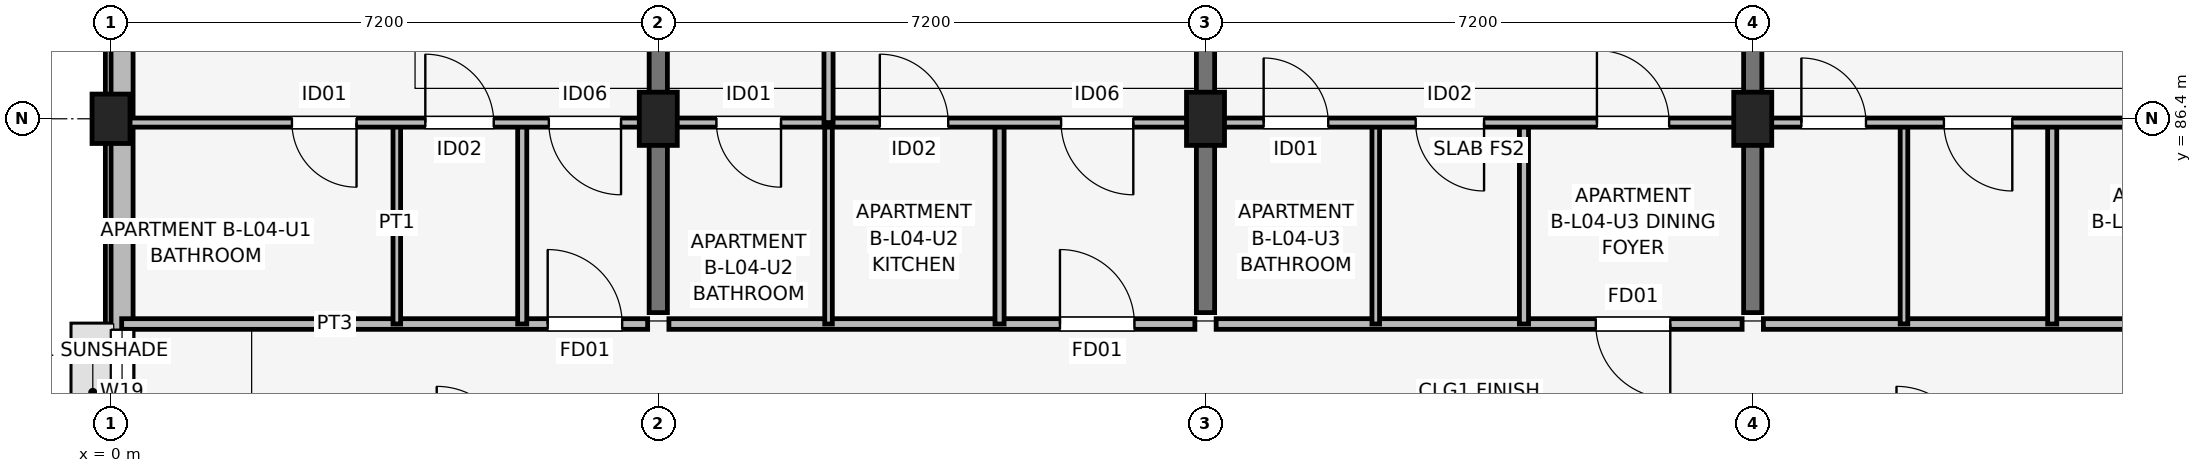
"""IFC4 building model, lengths in metres.
Left out: names, types, materials, properties, quantities, classifications, styles, units other than length and angle.
Written with IfcOpenShell. Run it as: python <this file> out.ifc"""

import sys

from ifc_helpers import new_model, si_unit, direction, frame, frame_2d, origin, origin_2d, place, context, subcontext, project, spatial, rectangle, extrude, element, fill, save


model = new_model("IFC4")
c1 = context("Model", 3, precision=1e-05, world=origin(), true_north=direction((0.0, 1.0)))
c2 = subcontext(c1, "Body", "Model", "MODEL_VIEW")
j1 = project(units=[si_unit("LENGTHUNIT", "METRE"), si_unit("PLANEANGLEUNIT", "RADIAN")], contexts=[c1])
p1 = place(None, origin())
s1 = spatial("IfcSite", under=j1, at=p1, CompositionType="ELEMENT")
p2 = place(p1, origin())
s2 = spatial("IfcBuilding", under=s1, at=p2, CompositionType="ELEMENT")
p3 = place(p2, frame((0.0, 0.0, 15.0)))
s3 = spatial("IfcBuildingStorey", under=s2, at=p3, CompositionType="ELEMENT", Elevation=15.0)
p4 = place(p3, frame((0.0, 86.4, 0.0), z_axis=(0.0, 0.0, 1.0), x_axis=(1.0, 0.0, 0.0)))
e1 = element("IfcColumn", 1, at=p4, inside=s3, PredefinedType="COLUMN", context=c2, shape_type="SweptSolid", body=[
    extrude(rectangle(XDim=0.5, YDim=0.65, at=origin_2d()), origin(), (0.0, 0.0, 1.0), 3.15),
])
for number, where, z_axis, x_axis in (
    (2, (7.2, 86.4, 0.0), (0.0, 0.0, 1.0), (1.0, 0.0, 0.0)),
    (3, (14.4, 86.4, 0.0), (0.0, 0.0, 1.0), (1.0, 0.0, 0.0)),
    (4, (21.6, 86.4, 0.0), (0.0, 0.0, 1.0), (1.0, 0.0, 0.0)),
):
    element("IfcColumn", number, at=place(p3, frame(where, z_axis=z_axis, x_axis=x_axis)), inside=s3, PredefinedType="COLUMN", context=c2, shape_type="SweptSolid", body=[
        extrude(rectangle(XDim=0.5, YDim=0.7, at=origin_2d()), origin(), (0.0, 0.0, 1.0), 3.15),
    ])
for number, where, z_axis, x_axis in (
    (5, (7.2, 83.85, 0.0), (0.0, 0.0, 1.0), (0.0, 1.0, 0.0)),
    (6, (14.4, 83.85, 0.0), (0.0, 0.0, 1.0), (0.0, 1.0, 0.0)),
    (7, (21.6, 83.85, 0.0), (0.0, 0.0, 1.0), (0.0, 1.0, 0.0)),
):
    element("IfcWall", number, at=place(p3, frame(where, z_axis=z_axis, x_axis=x_axis)), inside=s3, PredefinedType="SHEAR", context=c2, shape_type="SweptSolid", body=[
        extrude(rectangle(XDim=9.4, YDim=0.24, at=frame_2d((4.7, 0.0))), origin(), (0.0, 0.0, 1.0), 3.15),
    ])
p5 = place(p3, frame((0.145, 90.4, 0.0), z_axis=(0.0, 0.0, 1.0), x_axis=(0.0, -1.0, 0.0)))
e8 = element("IfcWall", 8, at=p5, inside=s3, PredefinedType="SOLIDWALL", context=c2, shape_type="SweptSolid", body=[
    extrude(rectangle(XDim=15.2, YDim=0.29, at=frame_2d((7.6, 0.0))), origin(), (0.0, 0.0, 1.0), 2.38),
])
p6 = place(p5, frame((6.775, 0.0, 1.05)))
e9 = element("IfcOpeningElement", 9, at=p6, cuts=e8, PredefinedType="OPENING", context=c2, shape_type="SweptSolid", body=[
    extrude(rectangle(XDim=1.65, YDim=1.15, at=frame_2d((0.825, 0.575))), frame((0.0, 0.155, 0.0), z_axis=(0.0, -1.0, 0.0), x_axis=(1.0, 0.0, 0.0)), (0.0, 0.0, 1.0), 0.31),
])
p7 = place(p5, frame((1.272, 0.0, 0.72)))
e10 = element("IfcOpeningElement", 10, at=p7, cuts=e8, PredefinedType="OPENING", context=c2, shape_type="SweptSolid", body=[
    extrude(rectangle(XDim=1.3, YDim=1.55, at=frame_2d((0.65, 0.775))), frame((0.0, 0.155, 0.0), z_axis=(0.0, -1.0, 0.0), x_axis=(1.0, 0.0, 0.0)), (0.0, 0.0, 1.0), 0.31),
])
p8 = place(p3, frame((0.14, 83.7, 0.0), z_axis=(0.0, 0.0, 1.0), x_axis=(1.0, 0.0, 0.0)))
e11 = element("IfcWall", 11, at=p8, inside=s3, PredefinedType="PARTITIONING", context=c2, shape_type="SweptSolid", body=[
    extrude(rectangle(XDim=6.92, YDim=0.14, at=frame_2d((3.46, 0.0))), origin(), (0.0, 0.0, 1.0), 2.38),
])
p9 = place(p8, frame((5.605, 0.0, 0.0)))
e12 = element("IfcOpeningElement", 12, at=p9, cuts=e11, PredefinedType="OPENING", context=c2, shape_type="SweptSolid", body=[
    extrude(rectangle(XDim=0.98, YDim=2.1, at=frame_2d((0.49, 1.05))), frame((0.0, 0.08, 0.0), z_axis=(0.0, -1.0, 0.0), x_axis=(1.0, 0.0, 0.0)), (0.0, 0.0, 1.0), 0.16),
])
p10 = place(p3, frame((3.76, 83.7, 0.0), z_axis=(0.0, 0.0, 1.0), x_axis=(0.0, 1.0, 0.0)))
e13 = element("IfcWall", 13, at=p10, inside=s3, PredefinedType="PARTITIONING", context=c2, shape_type="SweptSolid", body=[
    extrude(rectangle(XDim=2.65, YDim=0.1, at=frame_2d((1.325, 0.0))), origin(), (0.0, 0.0, 1.0), 2.375),
])
p11 = place(p3, frame((5.41, 83.7, 0.0), z_axis=(0.0, 0.0, 1.0), x_axis=(0.0, 1.0, 0.0)))
e14 = element("IfcWall", 14, at=p11, inside=s3, PredefinedType="PARTITIONING", context=c2, shape_type="SweptSolid", body=[
    extrude(rectangle(XDim=2.65, YDim=0.12, at=frame_2d((1.325, 0.0))), origin(), (0.0, 0.0, 1.0), 2.375),
])
p12 = place(p3, frame((0.14, 86.35, 0.0), z_axis=(0.0, 0.0, 1.0), x_axis=(1.0, 0.0, 0.0)))
e15 = element("IfcWall", 15, at=p12, inside=s3, PredefinedType="PARTITIONING", context=c2, shape_type="SweptSolid", body=[
    extrude(rectangle(XDim=6.92, YDim=0.12, at=frame_2d((3.46, 0.0))), origin(), (0.0, 0.0, 1.0), 2.375),
])
p13 = place(p12, frame((3.09, 0.0, 0.0), z_axis=(0.0, 0.0, 1.0), x_axis=(-1.0, 0.0, 0.0)))
e16 = element("IfcOpeningElement", 16, at=p13, cuts=e15, PredefinedType="OPENING", context=c2, shape_type="SweptSolid", body=[
    extrude(rectangle(XDim=0.85, YDim=2.08, at=frame_2d((0.425, 1.04))), frame((0.0, 0.07, 0.0), z_axis=(0.0, -1.0, 0.0), x_axis=(1.0, 0.0, 0.0)), (0.0, 0.0, 1.0), 0.14),
])
p14 = place(p12, frame((3.995, 0.0, 0.0)))
e17 = element("IfcOpeningElement", 17, at=p14, cuts=e15, PredefinedType="OPENING", context=c2, shape_type="SweptSolid", body=[
    extrude(rectangle(XDim=0.9, YDim=2.08, at=frame_2d((0.45, 1.04))), frame((0.0, 0.07, 0.0), z_axis=(0.0, -1.0, 0.0), x_axis=(1.0, 0.0, 0.0)), (0.0, 0.0, 1.0), 0.14),
])
p15 = place(p12, frame((6.57, 0.0, 0.0), z_axis=(0.0, 0.0, 1.0), x_axis=(-1.0, 0.0, 0.0)))
e18 = element("IfcOpeningElement", 18, at=p15, cuts=e15, PredefinedType="OPENING", context=c2, shape_type="SweptSolid", body=[
    extrude(rectangle(XDim=0.95, YDim=2.08, at=frame_2d((0.475, 1.04))), frame((0.0, 0.07, 0.0), z_axis=(0.0, -1.0, 0.0), x_axis=(1.0, 0.0, 0.0)), (0.0, 0.0, 1.0), 0.14),
])
p16 = place(p3, frame((7.34, 83.7, 0.0), z_axis=(0.0, 0.0, 1.0), x_axis=(1.0, 0.0, 0.0)))
e19 = element("IfcWall", 19, at=p16, inside=s3, PredefinedType="PARTITIONING", context=c2, shape_type="SweptSolid", body=[
    extrude(rectangle(XDim=6.92, YDim=0.14, at=frame_2d((3.46, 0.0))), origin(), (0.0, 0.0, 1.0), 2.38),
])
p17 = place(p16, frame((5.145, 0.0, 0.0)))
e20 = element("IfcOpeningElement", 20, at=p17, cuts=e19, PredefinedType="OPENING", context=c2, shape_type="SweptSolid", body=[
    extrude(rectangle(XDim=0.98, YDim=2.1, at=frame_2d((0.49, 1.05))), frame((0.0, 0.08, 0.0), z_axis=(0.0, -1.0, 0.0), x_axis=(1.0, 0.0, 0.0)), (0.0, 0.0, 1.0), 0.16),
])
p18 = place(p3, frame((9.44, 83.7, 0.0), z_axis=(0.0, 0.0, 1.0), x_axis=(0.0, 1.0, 0.0)))
e21 = element("IfcWall", 21, at=p18, inside=s3, PredefinedType="PARTITIONING", context=c2, shape_type="SweptSolid", body=[
    extrude(rectangle(XDim=2.65, YDim=0.1, at=frame_2d((1.325, 0.0))), origin(), (0.0, 0.0, 1.0), 2.375),
])
p19 = place(p3, frame((11.69, 83.7, 0.0), z_axis=(0.0, 0.0, 1.0), x_axis=(0.0, 1.0, 0.0)))
e22 = element("IfcWall", 22, at=p19, inside=s3, PredefinedType="PARTITIONING", context=c2, shape_type="SweptSolid", body=[
    extrude(rectangle(XDim=2.65, YDim=0.12, at=frame_2d((1.325, 0.0))), origin(), (0.0, 0.0, 1.0), 2.375),
])
p20 = place(p3, frame((7.34, 86.35, 0.0), z_axis=(0.0, 0.0, 1.0), x_axis=(1.0, 0.0, 0.0)))
e23 = element("IfcWall", 23, at=p20, inside=s3, PredefinedType="PARTITIONING", context=c2, shape_type="SweptSolid", body=[
    extrude(rectangle(XDim=6.92, YDim=0.12, at=frame_2d((3.46, 0.0))), origin(), (0.0, 0.0, 1.0), 2.375),
])
p21 = place(p20, frame((1.475, 0.0, 0.0), z_axis=(0.0, 0.0, 1.0), x_axis=(-1.0, 0.0, 0.0)))
e24 = element("IfcOpeningElement", 24, at=p21, cuts=e23, PredefinedType="OPENING", context=c2, shape_type="SweptSolid", body=[
    extrude(rectangle(XDim=0.85, YDim=2.08, at=frame_2d((0.425, 1.04))), frame((0.0, 0.07, 0.0), z_axis=(0.0, -1.0, 0.0), x_axis=(1.0, 0.0, 0.0)), (0.0, 0.0, 1.0), 0.14),
])
p22 = place(p20, frame((2.775, 0.0, 0.0)))
e25 = element("IfcOpeningElement", 25, at=p22, cuts=e23, PredefinedType="OPENING", context=c2, shape_type="SweptSolid", body=[
    extrude(rectangle(XDim=0.9, YDim=2.08, at=frame_2d((0.45, 1.04))), frame((0.0, 0.07, 0.0), z_axis=(0.0, -1.0, 0.0), x_axis=(1.0, 0.0, 0.0)), (0.0, 0.0, 1.0), 0.14),
])
p23 = place(p20, frame((6.11, 0.0, 0.0), z_axis=(0.0, 0.0, 1.0), x_axis=(-1.0, 0.0, 0.0)))
e26 = element("IfcOpeningElement", 26, at=p23, cuts=e23, PredefinedType="OPENING", context=c2, shape_type="SweptSolid", body=[
    extrude(rectangle(XDim=0.95, YDim=2.08, at=frame_2d((0.475, 1.04))), frame((0.0, 0.07, 0.0), z_axis=(0.0, -1.0, 0.0), x_axis=(1.0, 0.0, 0.0)), (0.0, 0.0, 1.0), 0.14),
])
p24 = place(p3, frame((9.44, 86.35, 0.0), z_axis=(0.0, 0.0, 1.0), x_axis=(0.0, 1.0, 0.0)))
e27 = element("IfcWall", 27, at=p24, inside=s3, PredefinedType="PARTITIONING", context=c2, shape_type="SweptSolid", body=[
    extrude(rectangle(XDim=6.95, YDim=0.12, at=frame_2d((3.475, 0.0))), origin(), (0.0, 0.0, 1.0), 2.375),
])
p25 = place(p24, frame((3.025, 0.0, 0.0)))
e28 = element("IfcOpeningElement", 28, at=p25, cuts=e27, PredefinedType="OPENING", context=c2, shape_type="SweptSolid", body=[
    extrude(rectangle(XDim=0.9, YDim=2.08, at=frame_2d((0.45, 1.04))), frame((0.0, 0.07, 0.0), z_axis=(0.0, -1.0, 0.0), x_axis=(1.0, 0.0, 0.0)), (0.0, 0.0, 1.0), 0.14),
])
p26 = place(p3, frame((14.54, 83.7, 0.0), z_axis=(0.0, 0.0, 1.0), x_axis=(1.0, 0.0, 0.0)))
e29 = element("IfcWall", 29, at=p26, inside=s3, PredefinedType="PARTITIONING", context=c2, shape_type="SweptSolid", body=[
    extrude(rectangle(XDim=6.92, YDim=0.14, at=frame_2d((3.46, 0.0))), origin(), (0.0, 0.0, 1.0), 2.38),
])
p27 = place(p26, frame((5.975, 0.0, 0.0), z_axis=(0.0, 0.0, 1.0), x_axis=(-1.0, 0.0, 0.0)))
e30 = element("IfcOpeningElement", 30, at=p27, cuts=e29, PredefinedType="OPENING", context=c2, shape_type="SweptSolid", body=[
    extrude(rectangle(XDim=0.98, YDim=2.1, at=frame_2d((0.49, 1.05))), frame((0.0, 0.08, 0.0), z_axis=(0.0, -1.0, 0.0), x_axis=(1.0, 0.0, 0.0)), (0.0, 0.0, 1.0), 0.16),
])
p28 = place(p3, frame((16.64, 83.7, 0.0), z_axis=(0.0, 0.0, 1.0), x_axis=(0.0, 1.0, 0.0)))
e31 = element("IfcWall", 31, at=p28, inside=s3, PredefinedType="PARTITIONING", context=c2, shape_type="SweptSolid", body=[
    extrude(rectangle(XDim=2.65, YDim=0.1, at=frame_2d((1.325, 0.0))), origin(), (0.0, 0.0, 1.0), 2.375),
])
p29 = place(p3, frame((18.59, 83.7, 0.0), z_axis=(0.0, 0.0, 1.0), x_axis=(0.0, 1.0, 0.0)))
e32 = element("IfcWall", 32, at=p29, inside=s3, PredefinedType="PARTITIONING", context=c2, shape_type="SweptSolid", body=[
    extrude(rectangle(XDim=2.65, YDim=0.12, at=frame_2d((1.325, 0.0))), origin(), (0.0, 0.0, 1.0), 2.375),
])
p30 = place(p3, frame((14.54, 86.35, 0.0), z_axis=(0.0, 0.0, 1.0), x_axis=(1.0, 0.0, 0.0)))
e33 = element("IfcWall", 33, at=p30, inside=s3, PredefinedType="PARTITIONING", context=c2, shape_type="SweptSolid", body=[
    extrude(rectangle(XDim=6.92, YDim=0.12, at=frame_2d((3.46, 0.0))), origin(), (0.0, 0.0, 1.0), 2.375),
])
p31 = place(p30, frame((0.625, 0.0, 0.0)))
e34 = element("IfcOpeningElement", 34, at=p31, cuts=e33, PredefinedType="OPENING", context=c2, shape_type="SweptSolid", body=[
    extrude(rectangle(XDim=0.85, YDim=2.08, at=frame_2d((0.425, 1.04))), frame((0.0, 0.07, 0.0), z_axis=(0.0, -1.0, 0.0), x_axis=(1.0, 0.0, 0.0)), (0.0, 0.0, 1.0), 0.14),
])
p32 = place(p30, frame((3.525, 0.0, 0.0), z_axis=(0.0, 0.0, 1.0), x_axis=(-1.0, 0.0, 0.0)))
e35 = element("IfcOpeningElement", 35, at=p32, cuts=e33, PredefinedType="OPENING", context=c2, shape_type="SweptSolid", body=[
    extrude(rectangle(XDim=0.9, YDim=2.08, at=frame_2d((0.45, 1.04))), frame((0.0, 0.07, 0.0), z_axis=(0.0, -1.0, 0.0), x_axis=(1.0, 0.0, 0.0)), (0.0, 0.0, 1.0), 0.14),
])
p33 = place(p30, frame((5.01, 0.0, 0.0)))
e36 = element("IfcOpeningElement", 36, at=p33, cuts=e33, PredefinedType="OPENING", context=c2, shape_type="SweptSolid", body=[
    extrude(rectangle(XDim=0.95, YDim=2.08, at=frame_2d((0.475, 1.04))), frame((0.0, 0.07, 0.0), z_axis=(0.0, -1.0, 0.0), x_axis=(1.0, 0.0, 0.0)), (0.0, 0.0, 1.0), 0.14),
])
p34 = place(p3, frame((21.74, 83.7, 0.0), z_axis=(0.0, 0.0, 1.0), x_axis=(1.0, 0.0, 0.0)))
e37 = element("IfcWall", 37, at=p34, inside=s3, PredefinedType="PARTITIONING", context=c2, shape_type="SweptSolid", body=[
    extrude(rectangle(XDim=6.92, YDim=0.14, at=frame_2d((3.46, 0.0))), origin(), (0.0, 0.0, 1.0), 2.38),
])
p35 = place(p34, frame((5.85, 0.0, 0.0), z_axis=(0.0, 0.0, 1.0), x_axis=(-1.0, 0.0, 0.0)))
e38 = element("IfcOpeningElement", 38, at=p35, cuts=e37, PredefinedType="OPENING", context=c2, shape_type="SweptSolid", body=[
    extrude(rectangle(XDim=0.98, YDim=2.1, at=frame_2d((0.49, 1.05))), frame((0.0, 0.08, 0.0), z_axis=(0.0, -1.0, 0.0), x_axis=(1.0, 0.0, 0.0)), (0.0, 0.0, 1.0), 0.16),
])
p36 = place(p3, frame((23.59, 83.7, 0.0), z_axis=(0.0, 0.0, 1.0), x_axis=(0.0, 1.0, 0.0)))
e39 = element("IfcWall", 39, at=p36, inside=s3, PredefinedType="PARTITIONING", context=c2, shape_type="SweptSolid", body=[
    extrude(rectangle(XDim=2.65, YDim=0.1, at=frame_2d((1.325, 0.0))), origin(), (0.0, 0.0, 1.0), 2.375),
])
p37 = place(p3, frame((25.54, 83.7, 0.0), z_axis=(0.0, 0.0, 1.0), x_axis=(0.0, 1.0, 0.0)))
e40 = element("IfcWall", 40, at=p37, inside=s3, PredefinedType="PARTITIONING", context=c2, shape_type="SweptSolid", body=[
    extrude(rectangle(XDim=2.65, YDim=0.12, at=frame_2d((1.325, 0.0))), origin(), (0.0, 0.0, 1.0), 2.375),
])
p38 = place(p3, frame((21.74, 86.35, 0.0), z_axis=(0.0, 0.0, 1.0), x_axis=(1.0, 0.0, 0.0)))
e41 = element("IfcWall", 41, at=p38, inside=s3, PredefinedType="PARTITIONING", context=c2, shape_type="SweptSolid", body=[
    extrude(rectangle(XDim=6.92, YDim=0.12, at=frame_2d((3.46, 0.0))), origin(), (0.0, 0.0, 1.0), 2.375),
])
p39 = place(p38, frame((0.5, 0.0, 0.0)))
e42 = element("IfcOpeningElement", 42, at=p39, cuts=e41, PredefinedType="OPENING", context=c2, shape_type="SweptSolid", body=[
    extrude(rectangle(XDim=0.85, YDim=2.08, at=frame_2d((0.425, 1.04))), frame((0.0, 0.07, 0.0), z_axis=(0.0, -1.0, 0.0), x_axis=(1.0, 0.0, 0.0)), (0.0, 0.0, 1.0), 0.14),
])
p40 = place(p38, frame((3.275, 0.0, 0.0), z_axis=(0.0, 0.0, 1.0), x_axis=(-1.0, 0.0, 0.0)))
e43 = element("IfcOpeningElement", 43, at=p40, cuts=e41, PredefinedType="OPENING", context=c2, shape_type="SweptSolid", body=[
    extrude(rectangle(XDim=0.9, YDim=2.08, at=frame_2d((0.45, 1.04))), frame((0.0, 0.07, 0.0), z_axis=(0.0, -1.0, 0.0), x_axis=(1.0, 0.0, 0.0)), (0.0, 0.0, 1.0), 0.14),
])
p41 = place(p38, frame((4.885, 0.0, 0.0)))
e44 = element("IfcOpeningElement", 44, at=p41, cuts=e41, PredefinedType="OPENING", context=c2, shape_type="SweptSolid", body=[
    extrude(rectangle(XDim=0.95, YDim=2.08, at=frame_2d((0.475, 1.04))), frame((0.0, 0.07, 0.0), z_axis=(0.0, -1.0, 0.0), x_axis=(1.0, 0.0, 0.0)), (0.0, 0.0, 1.0), 0.14),
])
p42 = place(p6, origin())
e45 = element("IfcWindow", 45, at=p42, inside=s3, PartitioningType="SINGLE_PANEL", PredefinedType="WINDOW", context=c2, shape_type="SweptSolid", body=[
    extrude(rectangle(XDim=1.65, YDim=1.15, at=frame_2d((0.825, 0.575))), frame((0.0, 0.03, 0.0), z_axis=(0.0, -1.0, 0.0), x_axis=(1.0, 0.0, 0.0)), (0.0, 0.0, 1.0), 0.06),
])
fill(e9, e45)
p43 = place(p9, origin())
e46 = element("IfcDoor", 46, at=p43, inside=s3, OperationType="SINGLE_SWING_LEFT", PredefinedType="DOOR", context=c2, shape_type="SweptSolid", body=[
    extrude(rectangle(XDim=0.98, YDim=2.1, at=frame_2d((0.49, 1.05))), frame((0.0, 0.025, 0.0), z_axis=(0.0, -1.0, 0.0), x_axis=(1.0, 0.0, 0.0)), (0.0, 0.0, 1.0), 0.05),
])
fill(e12, e46)
p44 = place(p13, origin())
e47 = element("IfcDoor", 47, at=p44, inside=s3, OperationType="SINGLE_SWING_RIGHT", PredefinedType="DOOR", context=c2, shape_type="SweptSolid", body=[
    extrude(rectangle(XDim=0.85, YDim=2.08, at=frame_2d((0.425, 1.04))), frame((0.0, 0.025, 0.0), z_axis=(0.0, -1.0, 0.0), x_axis=(1.0, 0.0, 0.0)), (0.0, 0.0, 1.0), 0.05),
])
fill(e16, e47)
p45 = place(p14, origin())
e48 = element("IfcDoor", 48, at=p45, inside=s3, OperationType="SINGLE_SWING_LEFT", PredefinedType="DOOR", context=c2, shape_type="SweptSolid", body=[
    extrude(rectangle(XDim=0.9, YDim=2.08, at=frame_2d((0.45, 1.04))), frame((0.0, 0.025, 0.0), z_axis=(0.0, -1.0, 0.0), x_axis=(1.0, 0.0, 0.0)), (0.0, 0.0, 1.0), 0.05),
])
fill(e17, e48)
p46 = place(p15, origin())
e49 = element("IfcDoor", 49, at=p46, inside=s3, OperationType="SINGLE_SWING_RIGHT", PredefinedType="DOOR", context=c2, shape_type="SweptSolid", body=[
    extrude(rectangle(XDim=0.95, YDim=2.08, at=frame_2d((0.475, 1.04))), frame((0.0, 0.025, 0.0), z_axis=(0.0, -1.0, 0.0), x_axis=(1.0, 0.0, 0.0)), (0.0, 0.0, 1.0), 0.05),
])
fill(e18, e49)
p47 = place(p17, origin())
e50 = element("IfcDoor", 50, at=p47, inside=s3, OperationType="SINGLE_SWING_LEFT", PredefinedType="DOOR", context=c2, shape_type="SweptSolid", body=[
    extrude(rectangle(XDim=0.98, YDim=2.1, at=frame_2d((0.49, 1.05))), frame((0.0, 0.025, 0.0), z_axis=(0.0, -1.0, 0.0), x_axis=(1.0, 0.0, 0.0)), (0.0, 0.0, 1.0), 0.05),
])
fill(e20, e50)
p48 = place(p21, origin())
e51 = element("IfcDoor", 51, at=p48, inside=s3, OperationType="SINGLE_SWING_RIGHT", PredefinedType="DOOR", context=c2, shape_type="SweptSolid", body=[
    extrude(rectangle(XDim=0.85, YDim=2.08, at=frame_2d((0.425, 1.04))), frame((0.0, 0.025, 0.0), z_axis=(0.0, -1.0, 0.0), x_axis=(1.0, 0.0, 0.0)), (0.0, 0.0, 1.0), 0.05),
])
fill(e24, e51)
p49 = place(p22, origin())
e52 = element("IfcDoor", 52, at=p49, inside=s3, OperationType="SINGLE_SWING_LEFT", PredefinedType="DOOR", context=c2, shape_type="SweptSolid", body=[
    extrude(rectangle(XDim=0.9, YDim=2.08, at=frame_2d((0.45, 1.04))), frame((0.0, 0.025, 0.0), z_axis=(0.0, -1.0, 0.0), x_axis=(1.0, 0.0, 0.0)), (0.0, 0.0, 1.0), 0.05),
])
fill(e25, e52)
p50 = place(p23, origin())
e53 = element("IfcDoor", 53, at=p50, inside=s3, OperationType="SINGLE_SWING_RIGHT", PredefinedType="DOOR", context=c2, shape_type="SweptSolid", body=[
    extrude(rectangle(XDim=0.95, YDim=2.08, at=frame_2d((0.475, 1.04))), frame((0.0, 0.025, 0.0), z_axis=(0.0, -1.0, 0.0), x_axis=(1.0, 0.0, 0.0)), (0.0, 0.0, 1.0), 0.05),
])
fill(e26, e53)
p51 = place(p27, origin())
e54 = element("IfcDoor", 54, at=p51, inside=s3, OperationType="SINGLE_SWING_RIGHT", PredefinedType="DOOR", context=c2, shape_type="SweptSolid", body=[
    extrude(rectangle(XDim=0.98, YDim=2.1, at=frame_2d((0.49, 1.05))), frame((0.0, 0.025, 0.0), z_axis=(0.0, -1.0, 0.0), x_axis=(1.0, 0.0, 0.0)), (0.0, 0.0, 1.0), 0.05),
])
fill(e30, e54)
p52 = place(p31, origin())
e55 = element("IfcDoor", 55, at=p52, inside=s3, OperationType="SINGLE_SWING_LEFT", PredefinedType="DOOR", context=c2, shape_type="SweptSolid", body=[
    extrude(rectangle(XDim=0.85, YDim=2.08, at=frame_2d((0.425, 1.04))), frame((0.0, 0.025, 0.0), z_axis=(0.0, -1.0, 0.0), x_axis=(1.0, 0.0, 0.0)), (0.0, 0.0, 1.0), 0.05),
])
fill(e34, e55)
p53 = place(p32, origin())
e56 = element("IfcDoor", 56, at=p53, inside=s3, OperationType="SINGLE_SWING_RIGHT", PredefinedType="DOOR", context=c2, shape_type="SweptSolid", body=[
    extrude(rectangle(XDim=0.9, YDim=2.08, at=frame_2d((0.45, 1.04))), frame((0.0, 0.025, 0.0), z_axis=(0.0, -1.0, 0.0), x_axis=(1.0, 0.0, 0.0)), (0.0, 0.0, 1.0), 0.05),
])
fill(e35, e56)
p54 = place(p33, origin())
e57 = element("IfcDoor", 57, at=p54, inside=s3, OperationType="SINGLE_SWING_LEFT", PredefinedType="DOOR", context=c2, shape_type="SweptSolid", body=[
    extrude(rectangle(XDim=0.95, YDim=2.08, at=frame_2d((0.475, 1.04))), frame((0.0, 0.025, 0.0), z_axis=(0.0, -1.0, 0.0), x_axis=(1.0, 0.0, 0.0)), (0.0, 0.0, 1.0), 0.05),
])
fill(e36, e57)
p55 = place(p39, origin())
e58 = element("IfcDoor", 58, at=p55, inside=s3, OperationType="SINGLE_SWING_LEFT", PredefinedType="DOOR", context=c2, shape_type="SweptSolid", body=[
    extrude(rectangle(XDim=0.85, YDim=2.08, at=frame_2d((0.425, 1.04))), frame((0.0, 0.025, 0.0), z_axis=(0.0, -1.0, 0.0), x_axis=(1.0, 0.0, 0.0)), (0.0, 0.0, 1.0), 0.05),
])
fill(e42, e58)
p56 = place(p40, origin())
e59 = element("IfcDoor", 59, at=p56, inside=s3, OperationType="SINGLE_SWING_RIGHT", PredefinedType="DOOR", context=c2, shape_type="SweptSolid", body=[
    extrude(rectangle(XDim=0.9, YDim=2.08, at=frame_2d((0.45, 1.04))), frame((0.0, 0.025, 0.0), z_axis=(0.0, -1.0, 0.0), x_axis=(1.0, 0.0, 0.0)), (0.0, 0.0, 1.0), 0.05),
])
fill(e43, e59)
save(model, sys.argv[1])
